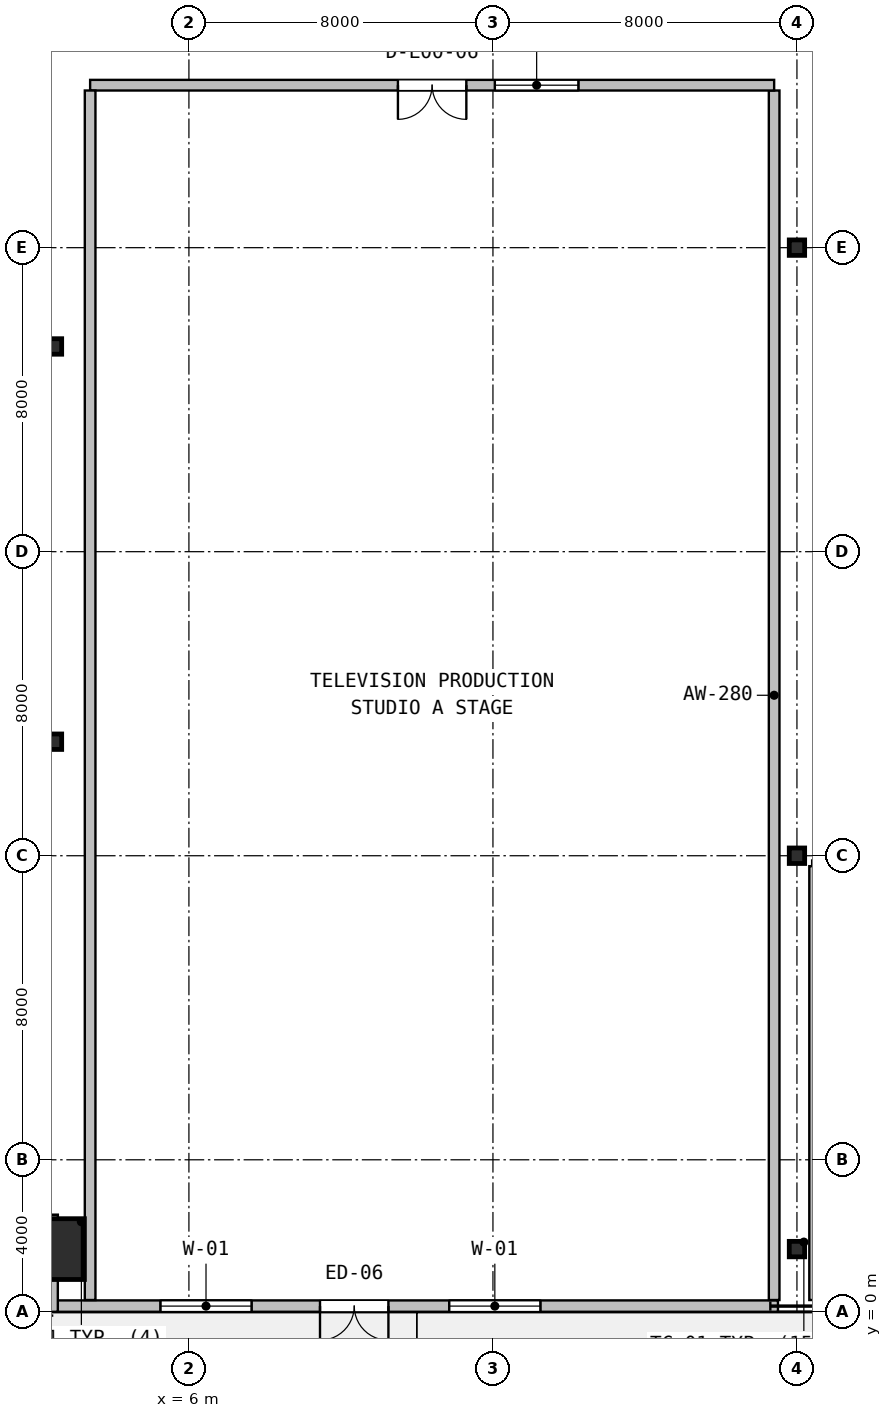
"""IFC4 building model, lengths in metres.
Left out: names, types, materials, properties, quantities, classifications, styles, units other than length and angle.
Written with IfcOpenShell. Run it as: python <this file> out.ifc"""

import sys

from ifc_helpers import new_model, si_unit, direction, frame, frame_2d, origin, origin_2d, place, context, subcontext, project, spatial, rectangle, hollow_rectangle, i_section, extrude, source, transform, mapped, element, fill, save


model = new_model("IFC4")
c1 = context("Model", 3, precision=1e-05, world=origin(), true_north=direction((0.0, 1.0)))
c2 = subcontext(c1, "Body", "Model", "MODEL_VIEW")
j1 = project(units=[si_unit("LENGTHUNIT", "METRE"), si_unit("PLANEANGLEUNIT", "RADIAN")], contexts=[c1])
p1 = place(None, origin())
s1 = spatial("IfcSite", under=j1, at=p1, CompositionType="ELEMENT")
p2 = place(p1, origin())
s2 = spatial("IfcBuilding", under=s1, at=p2, CompositionType="ELEMENT")
p3 = place(p2, origin())
s3 = spatial("IfcBuildingStorey", under=s2, at=p3, CompositionType="ELEMENT", Elevation=0.0)
m1 = source(origin(), c2, "Body", "SweptSolid", [
    extrude(hollow_rectangle(XDim=1.6, YDim=1.6, WallThickness=0.06, at=origin_2d()), origin(), (0.0, 0.0, 1.0), 6.0),
])
p4 = place(p3, frame((2.45, 1.65, 0.0), z_axis=(0.0, 0.0, 1.0), x_axis=(1.0, 0.0, 0.0)))
e1 = element("IfcColumn", 1, at=p4, inside=s3, PredefinedType="COLUMN", context=c2, shape_type="MappedRepresentation", body=[
    mapped(m1, transform((0.0, 0.0, 0.0), x_axis=(1.0, 0.0, 0.0), y_axis=(0.0, 1.0, 0.0), z_axis=(0.0, 0.0, 1.0), scale=1.0)),
])
m2 = source(origin(), c2, "Body", "SweptSolid", [
    extrude(i_section(OverallWidth=0.404, OverallDepth=0.407, WebThickness=0.027, FlangeThickness=0.044, FilletRadius=0.018, at=origin_2d()), origin(), (0.0, 0.0, 1.0), 6.0),
])
for number, where, z_axis, x_axis in (
    (2, (22.0, 1.65, 0.0), (0.0, 0.0, 1.0), (1.0, 0.0, 0.0)),
    (3, (22.0, 12.0, 0.0), (0.0, 0.0, 1.0), (1.0, 0.0, 0.0)),
    (4, (22.0, 28.0, 0.0), (0.0, 0.0, 1.0), (1.0, 0.0, 0.0)),
    (5, (2.45, 15.0, 0.0), (0.0, 0.0, 1.0), (1.0, 0.0, 0.0)),
    (6, (2.45, 25.4, 0.0), (0.0, 0.0, 1.0), (1.0, 0.0, 0.0)),
):
    element("IfcColumn", number, at=place(p3, frame(where, z_axis=z_axis, x_axis=x_axis)), inside=s3, PredefinedType="COLUMN", context=c2, shape_type="MappedRepresentation", body=[
        mapped(m2, transform((0.0, 0.0, 0.0), x_axis=(1.0, 0.0, 0.0), y_axis=(0.0, 1.0, 0.0), z_axis=(0.0, 0.0, 1.0), scale=1.0)),
    ])
p5 = place(p3, frame((2.25, 0.15, 0.0), z_axis=(0.0, 0.0, 1.0), x_axis=(1.0, 0.0, 0.0)))
e7 = element("IfcWall", 7, at=p5, inside=s3, PredefinedType="SOLIDWALL", context=c2, shape_type="SweptSolid", body=[
    extrude(rectangle(XDim=19.25, YDim=0.3, at=frame_2d((9.625, 0.0))), origin(), (0.0, 0.0, 1.0), 5.7),
])
p6 = place(p5, frame((7.2, 0.0, 0.0)))
e8 = element("IfcOpeningElement", 8, at=p6, cuts=e7, PredefinedType="OPENING", context=c2, shape_type="SweptSolid", body=[
    extrude(rectangle(XDim=1.8, YDim=2.15, at=frame_2d((0.9, 1.075))), frame((0.0, 0.16, 0.0), z_axis=(0.0, -1.0, 0.0), x_axis=(1.0, 0.0, 0.0)), (0.0, 0.0, 1.0), 0.32),
])
p7 = place(p5, frame((3.0, 0.0, 0.9)))
e9 = element("IfcOpeningElement", 9, at=p7, cuts=e7, PredefinedType="OPENING", context=c2, shape_type="SweptSolid", body=[
    extrude(rectangle(XDim=2.4, YDim=2.4, at=frame_2d((1.2, 1.2))), frame((0.0, 0.16, 0.0), z_axis=(0.0, -1.0, 0.0), x_axis=(1.0, 0.0, 0.0)), (0.0, 0.0, 1.0), 0.32),
])
p8 = place(p5, frame((10.6, 0.0, 0.9)))
e10 = element("IfcOpeningElement", 10, at=p8, cuts=e7, PredefinedType="OPENING", context=c2, shape_type="SweptSolid", body=[
    extrude(rectangle(XDim=2.4, YDim=2.4, at=frame_2d((1.2, 1.2))), frame((0.0, 0.16, 0.0), z_axis=(0.0, -1.0, 0.0), x_axis=(1.0, 0.0, 0.0)), (0.0, 0.0, 1.0), 0.32),
])
for number, where, z_axis, x_axis in (
    (11, (2.4, 0.0, 0.0), (0.0, 0.0, 1.0), (0.0, 1.0, 0.0)),
    (12, (0.0, 2.4, 0.0), (0.0, 0.0, 1.0), (1.0, 0.0, 0.0)),
):
    element("IfcWall", number, at=place(p3, frame(where, z_axis=z_axis, x_axis=x_axis)), inside=s3, PredefinedType="SOLIDWALL", context=c2, shape_type="SweptSolid", body=[
        extrude(rectangle(XDim=2.55, YDim=0.3, at=frame_2d((1.275, 0.0))), origin(), (0.0, 0.0, 1.0), 4.783),
    ])
p9 = place(p3, frame((22.4, 0.31, 0.0), z_axis=(0.0, 0.0, 1.0), x_axis=(0.0, 1.0, 0.0)))
e13 = element("IfcWall", 13, at=p9, inside=s3, PredefinedType="PARTITIONING", context=c2, shape_type="SweptSolid", body=[
    extrude(rectangle(XDim=11.415, YDim=0.15, at=frame_2d((5.708, 0.0))), origin(), (0.0, 0.0, 1.0), 4.783),
])
p10 = place(p3, frame((21.4, 0.31, 0.0), z_axis=(0.0, 0.0, 1.0), x_axis=(0.0, 1.0, 0.0)))
e14 = element("IfcWall", 14, at=p10, inside=s3, PredefinedType="SOLIDWALL", context=c2, shape_type="SweptSolid", body=[
    extrude(rectangle(XDim=31.825, YDim=0.28, at=frame_2d((15.913, 0.0))), origin(), (0.0, 0.0, 1.0), 4.783),
])
p11 = place(p3, frame((3.4, 32.275, 0.0), z_axis=(0.0, 0.0, 1.0), x_axis=(1.0, 0.0, 0.0)))
e15 = element("IfcWall", 15, at=p11, inside=s3, PredefinedType="SOLIDWALL", context=c2, shape_type="SweptSolid", body=[
    extrude(rectangle(XDim=18.0, YDim=0.28, at=frame_2d((9.0, 0.0))), origin(), (0.0, 0.0, 1.0), 5.7),
])
p12 = place(p11, frame((8.1, 0.0, 0.0)))
e16 = element("IfcOpeningElement", 16, at=p12, cuts=e15, PredefinedType="OPENING", context=c2, shape_type="SweptSolid", body=[
    extrude(rectangle(XDim=1.8, YDim=2.25, at=frame_2d((0.9, 1.125))), frame((0.0, 0.15, 0.0), z_axis=(0.0, -1.0, 0.0), x_axis=(1.0, 0.0, 0.0)), (0.0, 0.0, 1.0), 0.3),
])
p13 = place(p11, frame((10.65, 0.0, 0.95)))
e17 = element("IfcOpeningElement", 17, at=p13, cuts=e15, PredefinedType="OPENING", context=c2, shape_type="SweptSolid", body=[
    extrude(rectangle(XDim=2.2, YDim=1.3, at=frame_2d((1.1, 0.65))), frame((0.0, 0.15, 0.0), z_axis=(0.0, -1.0, 0.0), x_axis=(1.0, 0.0, 0.0)), (0.0, 0.0, 1.0), 0.3),
])
p14 = place(p3, frame((3.4, 0.31, 0.0), z_axis=(0.0, 0.0, 1.0), x_axis=(0.0, 1.0, 0.0)))
e18 = element("IfcWall", 18, at=p14, inside=s3, PredefinedType="SOLIDWALL", context=c2, shape_type="SweptSolid", body=[
    extrude(rectangle(XDim=31.825, YDim=0.28, at=frame_2d((15.913, 0.0))), origin(), (0.0, 0.0, 1.0), 4.783),
])
m3 = source(origin(), c2, "Body", "SweptSolid", [
    extrude(rectangle(XDim=1.8, YDim=2.15, at=frame_2d((0.9, 1.075))), frame((0.0, 0.025, 0.0), z_axis=(0.0, -1.0, 0.0), x_axis=(1.0, 0.0, 0.0)), (0.0, 0.0, 1.0), 0.05),
])
p15 = place(p6, frame((1.8, 0.0, 0.0), z_axis=(0.0, 0.0, 1.0), x_axis=(-1.0, 0.0, 0.0)))
e19 = element("IfcDoor", 19, at=p15, inside=s3, OperationType="DOUBLE_DOOR_SINGLE_SWING", PredefinedType="DOOR", context=c2, shape_type="MappedRepresentation", body=[
    mapped(m3, transform((0.0, 0.0, 0.0), x_axis=(1.0, 0.0, 0.0), y_axis=(0.0, 1.0, 0.0), z_axis=(0.0, 0.0, 1.0), scale=1.0)),
])
fill(e8, e19)
m4 = source(origin(), c2, "Body", "SweptSolid", [
    extrude(rectangle(XDim=2.4, YDim=2.4, at=frame_2d((1.2, 1.2))), frame((0.0, 0.03, 0.0), z_axis=(0.0, -1.0, 0.0), x_axis=(1.0, 0.0, 0.0)), (0.0, 0.0, 1.0), 0.06),
])
p16 = place(p7, origin())
e20 = element("IfcWindow", 20, at=p16, inside=s3, PartitioningType="DOUBLE_PANEL_VERTICAL", PredefinedType="WINDOW", context=c2, shape_type="MappedRepresentation", body=[
    mapped(m4, transform((0.0, 0.0, 0.0), x_axis=(1.0, 0.0, 0.0), y_axis=(0.0, 1.0, 0.0), z_axis=(0.0, 0.0, 1.0), scale=1.0)),
])
fill(e9, e20)
p17 = place(p8, origin())
e21 = element("IfcWindow", 21, at=p17, inside=s3, PartitioningType="DOUBLE_PANEL_VERTICAL", PredefinedType="WINDOW", context=c2, shape_type="MappedRepresentation", body=[
    mapped(m4, transform((0.0, 0.0, 0.0), x_axis=(1.0, 0.0, 0.0), y_axis=(0.0, 1.0, 0.0), z_axis=(0.0, 0.0, 1.0), scale=1.0)),
])
fill(e10, e21)
m5 = source(origin(), c2, "Body", "SweptSolid", [
    extrude(rectangle(XDim=1.8, YDim=2.25, at=frame_2d((0.9, 1.125))), frame((0.0, 0.025, 0.0), z_axis=(0.0, -1.0, 0.0), x_axis=(1.0, 0.0, 0.0)), (0.0, 0.0, 1.0), 0.05),
])
p18 = place(p12, frame((1.8, 0.0, 0.0), z_axis=(0.0, 0.0, 1.0), x_axis=(-1.0, 0.0, 0.0)))
e22 = element("IfcDoor", 22, at=p18, inside=s3, OperationType="DOUBLE_DOOR_SINGLE_SWING", PredefinedType="DOOR", context=c2, shape_type="MappedRepresentation", body=[
    mapped(m5, transform((0.0, 0.0, 0.0), x_axis=(1.0, 0.0, 0.0), y_axis=(0.0, 1.0, 0.0), z_axis=(0.0, 0.0, 1.0), scale=1.0)),
])
fill(e16, e22)
m6 = source(origin(), c2, "Body", "SweptSolid", [
    extrude(rectangle(XDim=2.2, YDim=1.3, at=frame_2d((1.1, 0.65))), frame((0.0, 0.03, 0.0), z_axis=(0.0, -1.0, 0.0), x_axis=(1.0, 0.0, 0.0)), (0.0, 0.0, 1.0), 0.06),
])
p19 = place(p13, origin())
e23 = element("IfcWindow", 23, at=p19, inside=s3, PartitioningType="SINGLE_PANEL", PredefinedType="WINDOW", context=c2, shape_type="MappedRepresentation", body=[
    mapped(m6, transform((0.0, 0.0, 0.0), x_axis=(1.0, 0.0, 0.0), y_axis=(0.0, 1.0, 0.0), z_axis=(0.0, 0.0, 1.0), scale=1.0)),
])
fill(e17, e23)
save(model, sys.argv[1])
